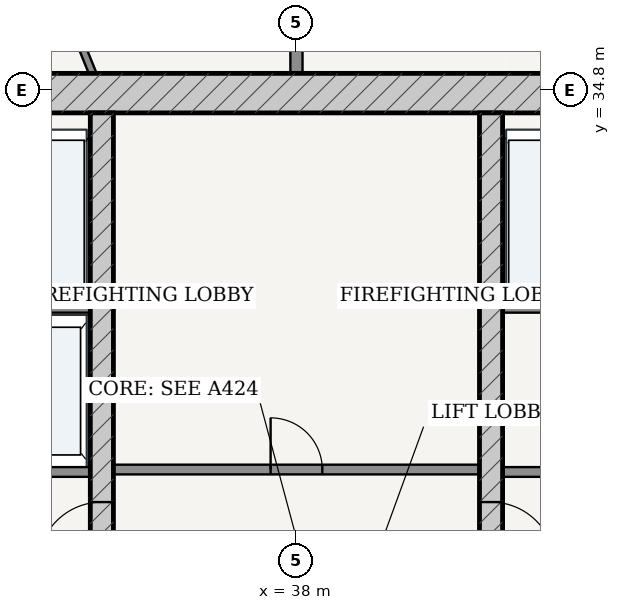
"""IFC4 building model, lengths in metres.
Left out: names, types, materials, properties, quantities, classifications, styles, units other than length and angle.
Written with IfcOpenShell. Run it as: python <this file> out.ifc"""

import sys

from ifc_helpers import new_model, si_unit, direction, frame, frame_2d, origin, place, context, subcontext, project, spatial, rectangle, extrude, source, transform, mapped, element, fill, save


model = new_model("IFC4")
c1 = context("Model", 3, precision=1e-05, world=origin(), true_north=direction((-0.2419218956, 0.970295726276)))
c2 = subcontext(c1, "Body", "Model", "MODEL_VIEW")
j1 = project(units=[si_unit("LENGTHUNIT", "METRE"), si_unit("PLANEANGLEUNIT", "RADIAN")], contexts=[c1])
p1 = place(None, origin())
s1 = spatial("IfcSite", under=j1, at=p1, CompositionType="ELEMENT")
p2 = place(p1, origin())
s2 = spatial("IfcBuilding", under=s1, at=p2, CompositionType="ELEMENT")
p3 = place(p2, frame((0.0, 0.0, 157.0)))
s3 = spatial("IfcBuildingStorey", under=s2, at=p3, CompositionType="ELEMENT", Elevation=157.0)
p4 = place(p3, frame((28.725, 34.75, 0.0), z_axis=(0.0, 0.0, 1.0), x_axis=(1.0, 0.0, 0.0)))
e1 = element("IfcWall", 1, at=p4, inside=s3, PredefinedType="SHEAR", context=c2, shape_type="SweptSolid", body=[
    extrude(rectangle(XDim=18.55, YDim=0.65, at=frame_2d((9.275, 0.0))), origin(), (0.0, 0.0, 1.0), 3.33),
])
p5 = place(p3, frame((34.8, 19.175, 0.0), z_axis=(0.0, 0.0, 1.0), x_axis=(0.0, 1.0, 0.0)))
e2 = element("IfcWall", 2, at=p5, inside=s3, PredefinedType="SHEAR", context=c2, shape_type="SweptSolid", body=[
    extrude(rectangle(XDim=15.25, YDim=0.38, at=frame_2d((7.625, 0.0))), origin(), (0.0, 0.0, 1.0), 3.33),
])
p6 = place(p5, frame((7.8, 0.0, 0.0)))
e3 = element("IfcOpeningElement", 3, at=p6, cuts=e2, PredefinedType="OPENING", context=c2, shape_type="SweptSolid", body=[
    extrude(rectangle(XDim=1.05, YDim=2.15, at=frame_2d((0.525, 1.075))), frame((0.0, 0.2, 0.0), z_axis=(0.0, -1.0, 0.0), x_axis=(1.0, 0.0, 0.0)), (0.0, 0.0, 1.0), 0.4),
])
p7 = place(p3, frame((41.2, 19.175, 0.0), z_axis=(0.0, 0.0, 1.0), x_axis=(0.0, 1.0, 0.0)))
e4 = element("IfcWall", 4, at=p7, inside=s3, PredefinedType="SHEAR", context=c2, shape_type="SweptSolid", body=[
    extrude(rectangle(XDim=15.25, YDim=0.38, at=frame_2d((7.625, 0.0))), origin(), (0.0, 0.0, 1.0), 3.33),
])
p8 = place(p7, frame((7.8, 0.0, 0.0)))
e5 = element("IfcOpeningElement", 5, at=p8, cuts=e4, PredefinedType="OPENING", context=c2, shape_type="SweptSolid", body=[
    extrude(rectangle(XDim=1.05, YDim=2.15, at=frame_2d((0.525, 1.075))), frame((0.0, 0.2, 0.0), z_axis=(0.0, -1.0, 0.0), x_axis=(1.0, 0.0, 0.0)), (0.0, 0.0, 1.0), 0.4),
])
p9 = place(p3, frame((32.86, 31.22, 0.0), z_axis=(0.0, 0.0, 1.0), x_axis=(1.0, 0.0, 0.0)))
e6 = element("IfcWall", 6, at=p9, inside=s3, PredefinedType="PARTITIONING", context=c2, shape_type="SweptSolid", body=[
    extrude(rectangle(XDim=1.75, YDim=0.16, at=frame_2d((0.875, 0.0))), origin(), (0.0, 0.0, 1.0), 3.33),
])
p10 = place(p3, frame((32.77, 28.52, 0.0), z_axis=(0.0, 0.0, 1.0), x_axis=(1.0, 0.0, 0.0)))
e7 = element("IfcWall", 7, at=p10, inside=s3, PredefinedType="PARTITIONING", context=c2, shape_type="SweptSolid", body=[
    extrude(rectangle(XDim=1.84, YDim=0.16, at=frame_2d((0.92, 0.0))), origin(), (0.0, 0.0, 1.0), 3.33),
])
p11 = place(p3, frame((41.39, 31.22, 0.0), z_axis=(0.0, 0.0, 1.0), x_axis=(1.0, 0.0, 0.0)))
e8 = element("IfcWall", 8, at=p11, inside=s3, PredefinedType="PARTITIONING", context=c2, shape_type="SweptSolid", body=[
    extrude(rectangle(XDim=1.75, YDim=0.16, at=frame_2d((0.875, 0.0))), origin(), (0.0, 0.0, 1.0), 3.33),
])
p12 = place(p3, frame((41.39, 28.52, 0.0), z_axis=(0.0, 0.0, 1.0), x_axis=(1.0, 0.0, 0.0)))
e9 = element("IfcWall", 9, at=p12, inside=s3, PredefinedType="PARTITIONING", context=c2, shape_type="SweptSolid", body=[
    extrude(rectangle(XDim=1.84, YDim=0.16, at=frame_2d((0.92, 0.0))), origin(), (0.0, 0.0, 1.0), 3.33),
])
p13 = place(p3, frame((34.99, 28.56, 0.0), z_axis=(0.0, 0.0, 1.0), x_axis=(1.0, 0.0, 0.0)))
e10 = element("IfcWall", 10, at=p13, inside=s3, PredefinedType="PARTITIONING", context=c2, shape_type="SweptSolid", body=[
    extrude(rectangle(XDim=6.02, YDim=0.16, at=frame_2d((3.01, 0.0))), origin(), (0.0, 0.0, 1.0), 3.33),
])
p14 = place(p13, frame((2.585, 0.0, 0.0)))
e11 = element("IfcOpeningElement", 11, at=p14, cuts=e10, PredefinedType="OPENING", context=c2, shape_type="SweptSolid", body=[
    extrude(rectangle(XDim=0.85, YDim=2.1, at=frame_2d((0.425, 1.05))), frame((0.0, 0.09, 0.0), z_axis=(0.0, -1.0, 0.0), x_axis=(1.0, 0.0, 0.0)), (0.0, 0.0, 1.0), 0.18),
])
p15 = place(p3, frame((38.0, 35.075, 0.0), z_axis=(0.0, 0.0, 1.0), x_axis=(0.0, 1.0, 0.0)))
e12 = element("IfcWall", 12, at=p15, inside=s3, PredefinedType="PARTITIONING", context=c2, shape_type="SweptSolid", body=[
    extrude(rectangle(XDim=12.465, YDim=0.2, at=frame_2d((6.232, 0.0))), origin(), (0.0, 0.0, 1.0), 2.415),
])
p16 = place(p3, frame((34.649, 35.075, 0.0), z_axis=(0.0, 0.0, 1.0), x_axis=(-0.37535719187, 0.926880239573, 0.0)))
e13 = element("IfcWall", 13, at=p16, inside=s3, PredefinedType="PARTITIONING", context=c2, shape_type="SweptSolid", body=[
    extrude(rectangle(XDim=2.916, YDim=0.12, at=frame_2d((1.458, 0.0))), origin(), (0.0, 0.0, 1.0), 3.33),
])
p17 = place(p16, frame((1.028, 0.0, 0.0)))
e14 = element("IfcOpeningElement", 14, at=p17, cuts=e13, PredefinedType="OPENING", context=c2, shape_type="SweptSolid", body=[
    extrude(rectangle(XDim=0.86, YDim=2.15, at=frame_2d((0.43, 1.075))), frame((0.0, 0.07, 0.0), z_axis=(0.0, -1.0, 0.0), x_axis=(1.0, 0.0, 0.0)), (0.0, 0.0, 1.0), 0.14),
])
m1 = source(origin(), c2, "Body", "SweptSolid", [
    extrude(rectangle(XDim=1.05, YDim=2.15, at=frame_2d((0.525, 1.075))), frame((0.0, 0.025, 0.0), z_axis=(0.0, -1.0, 0.0), x_axis=(1.0, 0.0, 0.0)), (0.0, 0.0, 1.0), 0.05),
])
p18 = place(p6, origin())
e15 = element("IfcDoor", 15, at=p18, inside=s3, OperationType="SINGLE_SWING_LEFT", PredefinedType="DOOR", context=c2, shape_type="MappedRepresentation", body=[
    mapped(m1, transform((0.0, 0.0, 0.0), scale=1.0)),
])
fill(e3, e15)
p19 = place(p8, frame((1.05, 0.0, 0.0), z_axis=(0.0, 0.0, 1.0), x_axis=(-1.0, 0.0, 0.0)))
e16 = element("IfcDoor", 16, at=p19, inside=s3, OperationType="SINGLE_SWING_RIGHT", PredefinedType="DOOR", context=c2, shape_type="MappedRepresentation", body=[
    mapped(m1, transform((0.0, 0.0, 0.0), scale=1.0)),
])
fill(e5, e16)
m2 = source(origin(), c2, "Body", "SweptSolid", [
    extrude(rectangle(XDim=0.85, YDim=2.1, at=frame_2d((0.425, 1.05))), frame((0.0, 0.025, 0.0), z_axis=(0.0, -1.0, 0.0), x_axis=(1.0, 0.0, 0.0)), (0.0, 0.0, 1.0), 0.05),
])
p20 = place(p14, origin())
e17 = element("IfcDoor", 17, at=p20, inside=s3, OperationType="SINGLE_SWING_LEFT", PredefinedType="DOOR", context=c2, shape_type="MappedRepresentation", body=[
    mapped(m2, transform((0.0, 0.0, 0.0), scale=1.0)),
])
fill(e11, e17)
save(model, sys.argv[1])
